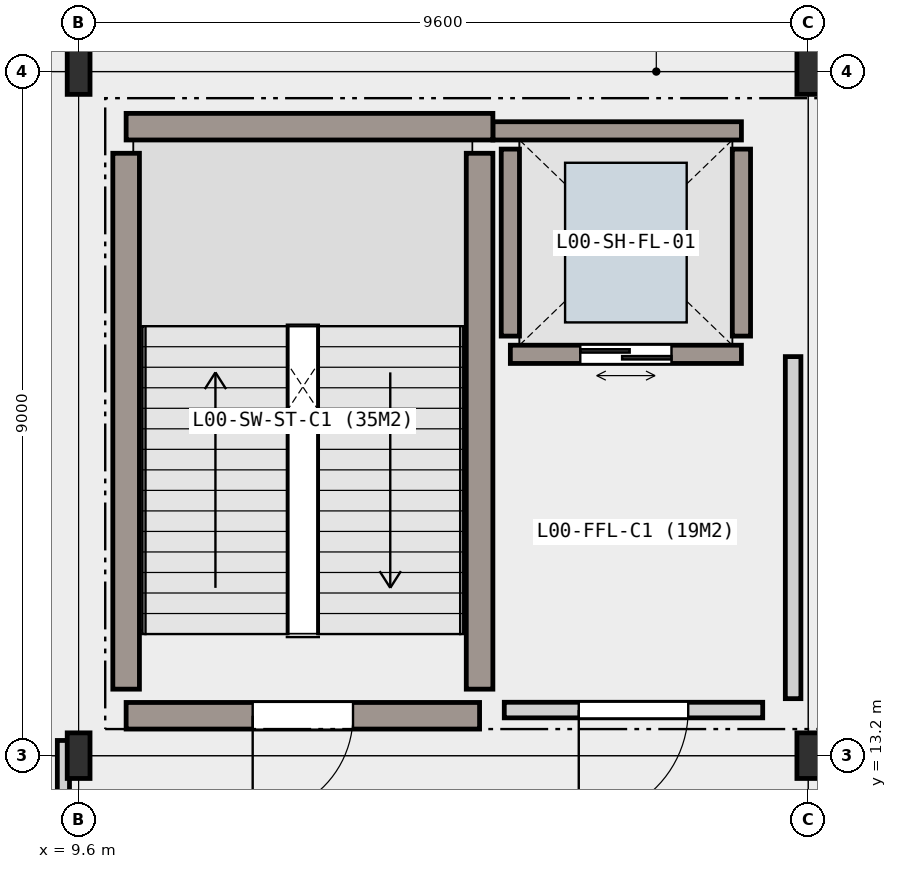
"""IFC4 building model, lengths in metres.
Left out: names, types, materials, properties, quantities, classifications, styles, units other than length and angle.
Written with IfcOpenShell. Run it as: python <this file> out.ifc"""

import sys

from ifc_helpers import new_model, si_unit, direction, frame, frame_2d, origin, origin_2d, place, context, subcontext, project, spatial, rectangle, i_section, extrude, element, fill, save


model = new_model("IFC4")
c1 = context("Model", 3, precision=1e-05, world=origin(), true_north=direction((0.0, 1.0)))
c2 = subcontext(c1, "Body", "Model", "MODEL_VIEW")
j1 = project(units=[si_unit("LENGTHUNIT", "METRE"), si_unit("PLANEANGLEUNIT", "RADIAN")], contexts=[c1])
p1 = place(None, origin())
s1 = spatial("IfcSite", under=j1, at=p1, CompositionType="ELEMENT")
p2 = place(p1, origin())
s2 = spatial("IfcBuilding", under=s1, at=p2, CompositionType="ELEMENT")
p3 = place(p2, origin())
s3 = spatial("IfcBuildingStorey", under=s2, at=p3, CompositionType="ELEMENT", Elevation=0.0)
for number, where, z_axis, x_axis in (
    (1, (9.6, 13.2, 0.0), (0.0, 0.0, 1.0), (1.0, 0.0, 0.0)),
    (2, (9.6, 22.2, 0.0), (0.0, 0.0, 1.0), (1.0, 0.0, 0.0)),
    (3, (19.2, 13.2, 0.0), (0.0, 0.0, 1.0), (1.0, 0.0, 0.0)),
    (4, (19.2, 22.2, 0.0), (0.0, 0.0, 1.0), (1.0, 0.0, 0.0)),
):
    element("IfcColumn", number, at=place(p3, frame(where, z_axis=z_axis, x_axis=x_axis)), inside=s3, PredefinedType="COLUMN", context=c2, shape_type="SweptSolid", body=[
        extrude(i_section(OverallWidth=0.3, OverallDepth=0.6, WebThickness=0.015, FlangeThickness=0.03, FilletRadius=0.027, at=origin_2d()), origin(), (0.0, 0.0, 1.0), 5.4),
    ])
p4 = place(p3, frame((18.32, 18.48, 0.0), z_axis=(0.0, 0.0, 1.0), x_axis=(-1.0, 0.0, 0.0)))
e5 = element("IfcWall", 5, at=p4, inside=s3, PredefinedType="SHEAR", context=c2, shape_type="SweptSolid", body=[
    extrude(rectangle(XDim=3.04, YDim=0.24, at=frame_2d((1.52, 0.0))), origin(), (0.0, 0.0, 1.0), 5.12),
])
p5 = place(p4, frame((0.92, 0.0, 0.0)))
e6 = element("IfcOpeningElement", 6, at=p5, cuts=e5, PredefinedType="OPENING", context=c2, shape_type="SweptSolid", body=[
    extrude(rectangle(XDim=1.2, YDim=2.15, at=frame_2d((0.6, 1.075))), frame((0.0, 0.13, 0.0), z_axis=(0.0, -1.0, 0.0), x_axis=(1.0, 0.0, 0.0)), (0.0, 0.0, 1.0), 0.26),
])
p6 = place(p3, frame((15.05, 21.42, 0.0), z_axis=(0.0, 0.0, 1.0), x_axis=(1.0, 0.0, 0.0)))
e7 = element("IfcWall", 7, at=p6, inside=s3, PredefinedType="SHEAR", context=c2, shape_type="SweptSolid", body=[
    extrude(rectangle(XDim=3.27, YDim=0.24, at=frame_2d((1.635, 0.0))), origin(), (0.0, 0.0, 1.0), 5.12),
])
for number, where, z_axis, x_axis in (
    (8, (15.28, 18.72, 0.0), (0.0, 0.0, 1.0), (0.0, 1.0, 0.0)),
    (9, (18.32, 21.18, 0.0), (0.0, 0.0, 1.0), (0.0, -1.0, 0.0)),
):
    element("IfcWall", number, at=place(p3, frame(where, z_axis=z_axis, x_axis=x_axis)), inside=s3, PredefinedType="SHEAR", context=c2, shape_type="SweptSolid", body=[
        extrude(rectangle(XDim=2.46, YDim=0.24, at=frame_2d((1.23, 0.0))), origin(), (0.0, 0.0, 1.0), 5.12),
    ])
p7 = place(p3, frame((14.875, 13.725, 0.0), z_axis=(0.0, 0.0, 1.0), x_axis=(-1.0, 0.0, 0.0)))
e10 = element("IfcWall", 10, at=p7, inside=s3, PredefinedType="SHEAR", context=c2, shape_type="SweptSolid", body=[
    extrude(rectangle(XDim=4.65, YDim=0.35, at=frame_2d((2.325, 0.0))), origin(), (0.0, 0.0, 1.0), 5.12),
])
p8 = place(p7, frame((1.665, 0.0, 0.0)))
e11 = element("IfcOpeningElement", 11, at=p8, cuts=e10, PredefinedType="OPENING", context=c2, shape_type="SweptSolid", body=[
    extrude(rectangle(XDim=1.32, YDim=2.15, at=frame_2d((0.66, 1.075))), frame((0.0, 0.185, 0.0), z_axis=(0.0, -1.0, 0.0), x_axis=(1.0, 0.0, 0.0)), (0.0, 0.0, 1.0), 0.37),
])
p9 = place(p3, frame((10.225, 21.475, 0.0), z_axis=(0.0, 0.0, 1.0), x_axis=(1.0, 0.0, 0.0)))
e12 = element("IfcWall", 12, at=p9, inside=s3, PredefinedType="SHEAR", context=c2, shape_type="SweptSolid", body=[
    extrude(rectangle(XDim=4.825, YDim=0.35, at=frame_2d((2.413, 0.0))), origin(), (0.0, 0.0, 1.0), 5.12),
])
for number, where, z_axis, x_axis in (
    (13, (10.225, 14.075, 0.0), (0.0, 0.0, 1.0), (0.0, 1.0, 0.0)),
    (14, (14.875, 21.125, 0.0), (0.0, 0.0, 1.0), (0.0, -1.0, 0.0)),
):
    element("IfcWall", number, at=place(p3, frame(where, z_axis=z_axis, x_axis=x_axis)), inside=s3, PredefinedType="SHEAR", context=c2, shape_type="SweptSolid", body=[
        extrude(rectangle(XDim=7.05, YDim=0.35, at=frame_2d((3.525, 0.0))), origin(), (0.0, 0.0, 1.0), 5.12),
    ])
p10 = place(p3, frame((18.6, 13.8, 0.0), z_axis=(0.0, 0.0, 1.0), x_axis=(-1.0, 0.0, 0.0)))
e15 = element("IfcWall", 15, at=p10, inside=s3, PredefinedType="PARTITIONING", context=c2, shape_type="SweptSolid", body=[
    extrude(rectangle(XDim=3.4, YDim=0.205, at=frame_2d((1.7, 0.0))), origin(), (0.0, 0.0, 1.0), 5.12),
])
p11 = place(p10, frame((0.98, 0.0, 0.0)))
e16 = element("IfcOpeningElement", 16, at=p11, cuts=e15, PredefinedType="OPENING", context=c2, shape_type="SweptSolid", body=[
    extrude(rectangle(XDim=1.44, YDim=2.18, at=frame_2d((0.72, 1.09))), frame((0.0, 0.113, 0.0), z_axis=(0.0, -1.0, 0.0), x_axis=(1.0, 0.0, 0.0)), (0.0, 0.0, 1.0), 0.225),
])
p12 = place(p3, frame((19.0, 18.45, 0.0), z_axis=(0.0, 0.0, 1.0), x_axis=(0.0, -1.0, 0.0)))
e17 = element("IfcWall", 17, at=p12, inside=s3, PredefinedType="PARTITIONING", context=c2, shape_type="SweptSolid", body=[
    extrude(rectangle(XDim=4.5, YDim=0.205, at=frame_2d((2.25, 0.0))), origin(), (0.0, 0.0, 1.0), 4.54),
])
p13 = place(p3, frame((9.4, 13.4, 0.0), z_axis=(0.0, 0.0, 1.0), x_axis=(0.0, -1.0, 0.0)))
e18 = element("IfcWall", 18, at=p13, inside=s3, PredefinedType="PARTITIONING", context=c2, shape_type="SweptSolid", body=[
    extrude(rectangle(XDim=3.4, YDim=0.16, at=frame_2d((1.7, 0.0))), origin(), (0.0, 0.0, 1.0), 4.59),
])
p14 = place(p13, frame((1.14, 0.0, 0.0)))
e19 = element("IfcOpeningElement", 19, at=p14, cuts=e18, PredefinedType="OPENING", context=c2, shape_type="SweptSolid", body=[
    extrude(rectangle(XDim=1.12, YDim=2.15, at=frame_2d((0.56, 1.075))), frame((0.0, 0.09, 0.0), z_axis=(0.0, -1.0, 0.0), x_axis=(1.0, 0.0, 0.0)), (0.0, 0.0, 1.0), 0.18),
])
p15 = place(p5, origin())
e20 = element("IfcDoor", 20, at=p15, inside=s3, OperationType="DOUBLE_DOOR_SLIDING", PredefinedType="DOOR", context=c2, shape_type="SweptSolid", body=[
    extrude(rectangle(XDim=1.2, YDim=2.15, at=frame_2d((0.6, 1.075))), frame((0.0, 0.025, 0.0), z_axis=(0.0, -1.0, 0.0), x_axis=(1.0, 0.0, 0.0)), (0.0, 0.0, 1.0), 0.05),
])
fill(e6, e20)
p16 = place(p8, origin())
e21 = element("IfcDoor", 21, at=p16, inside=s3, OperationType="SINGLE_SWING_RIGHT", PredefinedType="DOOR", context=c2, shape_type="SweptSolid", body=[
    extrude(rectangle(XDim=1.32, YDim=2.15, at=frame_2d((0.66, 1.075))), frame((0.0, 0.025, 0.0), z_axis=(0.0, -1.0, 0.0), x_axis=(1.0, 0.0, 0.0)), (0.0, 0.0, 1.0), 0.05),
])
fill(e11, e21)
p17 = place(p11, origin())
e22 = element("IfcDoor", 22, at=p17, inside=s3, OperationType="SINGLE_SWING_RIGHT", PredefinedType="DOOR", context=c2, shape_type="SweptSolid", body=[
    extrude(rectangle(XDim=1.44, YDim=2.18, at=frame_2d((0.72, 1.09))), frame((0.0, 0.025, 0.0), z_axis=(0.0, -1.0, 0.0), x_axis=(1.0, 0.0, 0.0)), (0.0, 0.0, 1.0), 0.05),
])
fill(e16, e22)
save(model, sys.argv[1])
